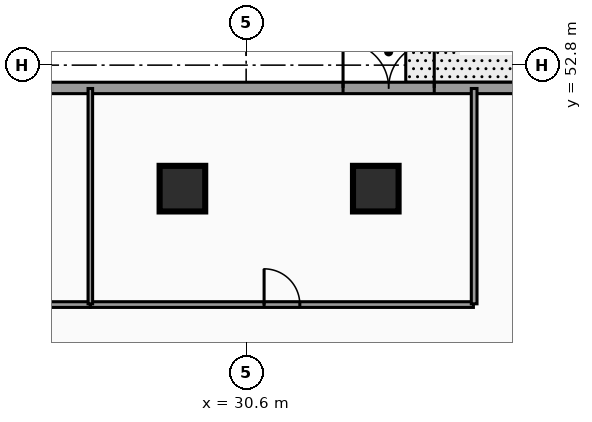
"""IFC4 building model, lengths in metres.
Left out: names, types, materials, properties, quantities, classifications, styles, units other than length and angle.
Written with IfcOpenShell. Run it as: python <this file> out.ifc"""

import sys

from ifc_helpers import new_model, si_unit, direction, frame, frame_2d, origin, origin_2d, place, context, subcontext, project, spatial, rectangle, hollow_rectangle, extrude, element, fill, save


model = new_model("IFC4")
c1 = context("Model", 3, precision=1e-05, world=origin(), true_north=direction((0.0, 1.0)))
c2 = subcontext(c1, "Body", "Model", "MODEL_VIEW")
j1 = project(units=[si_unit("LENGTHUNIT", "METRE"), si_unit("PLANEANGLEUNIT", "RADIAN")], contexts=[c1])
p1 = place(None, origin())
s1 = spatial("IfcSite", under=j1, at=p1, CompositionType="ELEMENT")
p2 = place(p1, origin())
s2 = spatial("IfcBuilding", under=s1, at=p2, CompositionType="ELEMENT")
p3 = place(p2, origin())
s3 = spatial("IfcBuildingStorey", under=s2, at=p3, CompositionType="ELEMENT", Elevation=0.0)
for number, where, z_axis, x_axis in (
    (1, (34.011, 49.55, 0.0), (0.0, 0.0, 1.0), (1.0, 0.0, 0.0)),
    (2, (28.923, 49.55, 0.0), (0.0, 0.0, 1.0), (1.0, 0.0, 0.0)),
):
    element("IfcColumn", number, at=place(p3, frame(where, z_axis=z_axis, x_axis=x_axis)), inside=s3, PredefinedType="COLUMN", context=c2, shape_type="SweptSolid", body=[
        extrude(hollow_rectangle(XDim=1.2, YDim=1.2, WallThickness=0.06, at=origin_2d()), origin(), (0.0, 0.0, 1.0), 4.82),
    ])
p4 = place(p3, frame((1.7, 52.2, 0.0), z_axis=(0.0, 0.0, 1.0), x_axis=(1.0, 0.0, 0.0)))
e3 = element("IfcWall", 3, at=p4, inside=s3, PredefinedType="STANDARD", context=c2, shape_type="SweptSolid", body=[
    extrude(rectangle(XDim=73.4, YDim=0.3, at=frame_2d((36.7, 0.0))), origin(), (0.0, 0.0, 1.0), 4.205),
])
p5 = place(p4, frame((7.3, 0.0, 0.0)))
e4 = element("IfcOpeningElement", 4, at=p5, cuts=e3, PredefinedType="OPENING", context=c2, shape_type="SweptSolid", body=[
    extrude(rectangle(XDim=4.0, YDim=3.5, at=frame_2d((2.0, 1.75))), frame((0.0, 0.16, 0.0), z_axis=(0.0, -1.0, 0.0), x_axis=(1.0, 0.0, 0.0)), (0.0, 0.0, 1.0), 0.32),
])
p6 = place(p4, frame((31.45, 0.0, 0.0)))
e5 = element("IfcOpeningElement", 5, at=p6, cuts=e3, PredefinedType="OPENING", context=c2, shape_type="SweptSolid", body=[
    extrude(rectangle(XDim=2.4, YDim=2.6, at=frame_2d((1.2, 1.3))), frame((0.0, 0.16, 0.0), z_axis=(0.0, -1.0, 0.0), x_axis=(1.0, 0.0, 0.0)), (0.0, 0.0, 1.0), 0.32),
])
p7 = place(p4, frame((44.2, 0.0, 1.0)))
e6 = element("IfcOpeningElement", 6, at=p7, cuts=e3, PredefinedType="OPENING", context=c2, shape_type="SweptSolid", body=[
    extrude(rectangle(XDim=1.2, YDim=1.5, at=frame_2d((0.6, 0.75))), frame((0.0, 0.16, 0.0), z_axis=(0.0, -1.0, 0.0), x_axis=(1.0, 0.0, 0.0)), (0.0, 0.0, 1.0), 0.32),
])
p8 = place(p4, frame((11.9, 0.0, 0.95)))
e7 = element("IfcOpeningElement", 7, at=p8, cuts=e3, PredefinedType="OPENING", context=c2, shape_type="SweptSolid", body=[
    extrude(rectangle(XDim=1.8, YDim=2.1, at=frame_2d((0.9, 1.05))), frame((0.0, 0.16, 0.0), z_axis=(0.0, -1.0, 0.0), x_axis=(1.0, 0.0, 0.0)), (0.0, 0.0, 1.0), 0.32),
])
p9 = place(p4, frame((59.8, 0.0, 0.95)))
e8 = element("IfcOpeningElement", 8, at=p9, cuts=e3, PredefinedType="OPENING", context=c2, shape_type="SweptSolid", body=[
    extrude(rectangle(XDim=1.8, YDim=2.1, at=frame_2d((0.9, 1.05))), frame((0.0, 0.16, 0.0), z_axis=(0.0, -1.0, 0.0), x_axis=(1.0, 0.0, 0.0)), (0.0, 0.0, 1.0), 0.32),
])
p10 = place(p4, frame((66.8, 0.0, 0.95)))
e9 = element("IfcOpeningElement", 9, at=p10, cuts=e3, PredefinedType="OPENING", context=c2, shape_type="SweptSolid", body=[
    extrude(rectangle(XDim=1.8, YDim=2.1, at=frame_2d((0.9, 1.05))), frame((0.0, 0.16, 0.0), z_axis=(0.0, -1.0, 0.0), x_axis=(1.0, 0.0, 0.0)), (0.0, 0.0, 1.0), 0.32),
])
p11 = place(p3, frame((18.2, 46.5, 0.0), z_axis=(0.0, 0.0, 1.0), x_axis=(1.0, 0.0, 0.0)))
e10 = element("IfcWall", 10, at=p11, inside=s3, PredefinedType="PARTITIONING", context=c2, shape_type="SweptSolid", body=[
    extrude(rectangle(XDim=8.295, YDim=0.15, at=frame_2d((4.147, 0.0))), origin(), (0.0, 0.0, 1.0), 3.777),
])
p12 = place(p11, frame((3.677, 0.0, 0.0)))
e11 = element("IfcOpeningElement", 11, at=p12, cuts=e10, PredefinedType="OPENING", context=c2, shape_type="SweptSolid", body=[
    extrude(rectangle(XDim=0.94, YDim=2.05, at=frame_2d((0.47, 1.025))), frame((0.0, 0.085, 0.0), z_axis=(0.0, -1.0, 0.0), x_axis=(1.0, 0.0, 0.0)), (0.0, 0.0, 1.0), 0.17),
])
p13 = place(p3, frame((26.505, 46.5, 0.0), z_axis=(0.0, 0.0, 1.0), x_axis=(1.0, 0.0, 0.0)))
e12 = element("IfcWall", 12, at=p13, inside=s3, PredefinedType="PARTITIONING", context=c2, shape_type="SweptSolid", body=[
    extrude(rectangle(XDim=10.075, YDim=0.15, at=frame_2d((5.038, 0.0))), origin(), (0.0, 0.0, 1.0), 3.777),
])
p14 = place(p13, frame((4.567, 0.0, 0.0)))
e13 = element("IfcOpeningElement", 13, at=p14, cuts=e12, PredefinedType="OPENING", context=c2, shape_type="SweptSolid", body=[
    extrude(rectangle(XDim=0.94, YDim=2.05, at=frame_2d((0.47, 1.025))), frame((0.0, 0.085, 0.0), z_axis=(0.0, -1.0, 0.0), x_axis=(1.0, 0.0, 0.0)), (0.0, 0.0, 1.0), 0.17),
])
p15 = place(p3, frame((36.6, 46.52, 0.0), z_axis=(0.0, 0.0, 1.0), x_axis=(0.0, 1.0, 0.0)))
e14 = element("IfcWall", 14, at=p15, inside=s3, PredefinedType="PARTITIONING", context=c2, shape_type="SweptSolid", body=[
    extrude(rectangle(XDim=5.665, YDim=0.15, at=frame_2d((2.833, 0.0))), origin(), (0.0, 0.0, 1.0), 3.777),
])
p16 = place(p3, frame((26.5, 46.52, 0.0), z_axis=(0.0, 0.0, 1.0), x_axis=(0.0, 1.0, 0.0)))
e15 = element("IfcWall", 15, at=p16, inside=s3, PredefinedType="PARTITIONING", context=c2, shape_type="SweptSolid", body=[
    extrude(rectangle(XDim=5.665, YDim=0.12, at=frame_2d((2.833, 0.0))), origin(), (0.0, 0.0, 1.0), 3.777),
])
p17 = place(p6, origin())
e16 = element("IfcDoor", 16, at=p17, inside=s3, OperationType="DOUBLE_DOOR_SINGLE_SWING", PredefinedType="DOOR", context=c2, shape_type="SweptSolid", body=[
    extrude(rectangle(XDim=2.4, YDim=2.6, at=frame_2d((1.2, 1.3))), frame((0.0, 0.025, 0.0), z_axis=(0.0, -1.0, 0.0), x_axis=(1.0, 0.0, 0.0)), (0.0, 0.0, 1.0), 0.05),
])
fill(e5, e16)
p18 = place(p14, origin())
e17 = element("IfcDoor", 17, at=p18, inside=s3, OperationType="SINGLE_SWING_LEFT", PredefinedType="DOOR", context=c2, shape_type="SweptSolid", body=[
    extrude(rectangle(XDim=0.94, YDim=2.05, at=frame_2d((0.47, 1.025))), frame((0.0, 0.025, 0.0), z_axis=(0.0, -1.0, 0.0), x_axis=(1.0, 0.0, 0.0)), (0.0, 0.0, 1.0), 0.05),
])
fill(e13, e17)
save(model, sys.argv[1])
